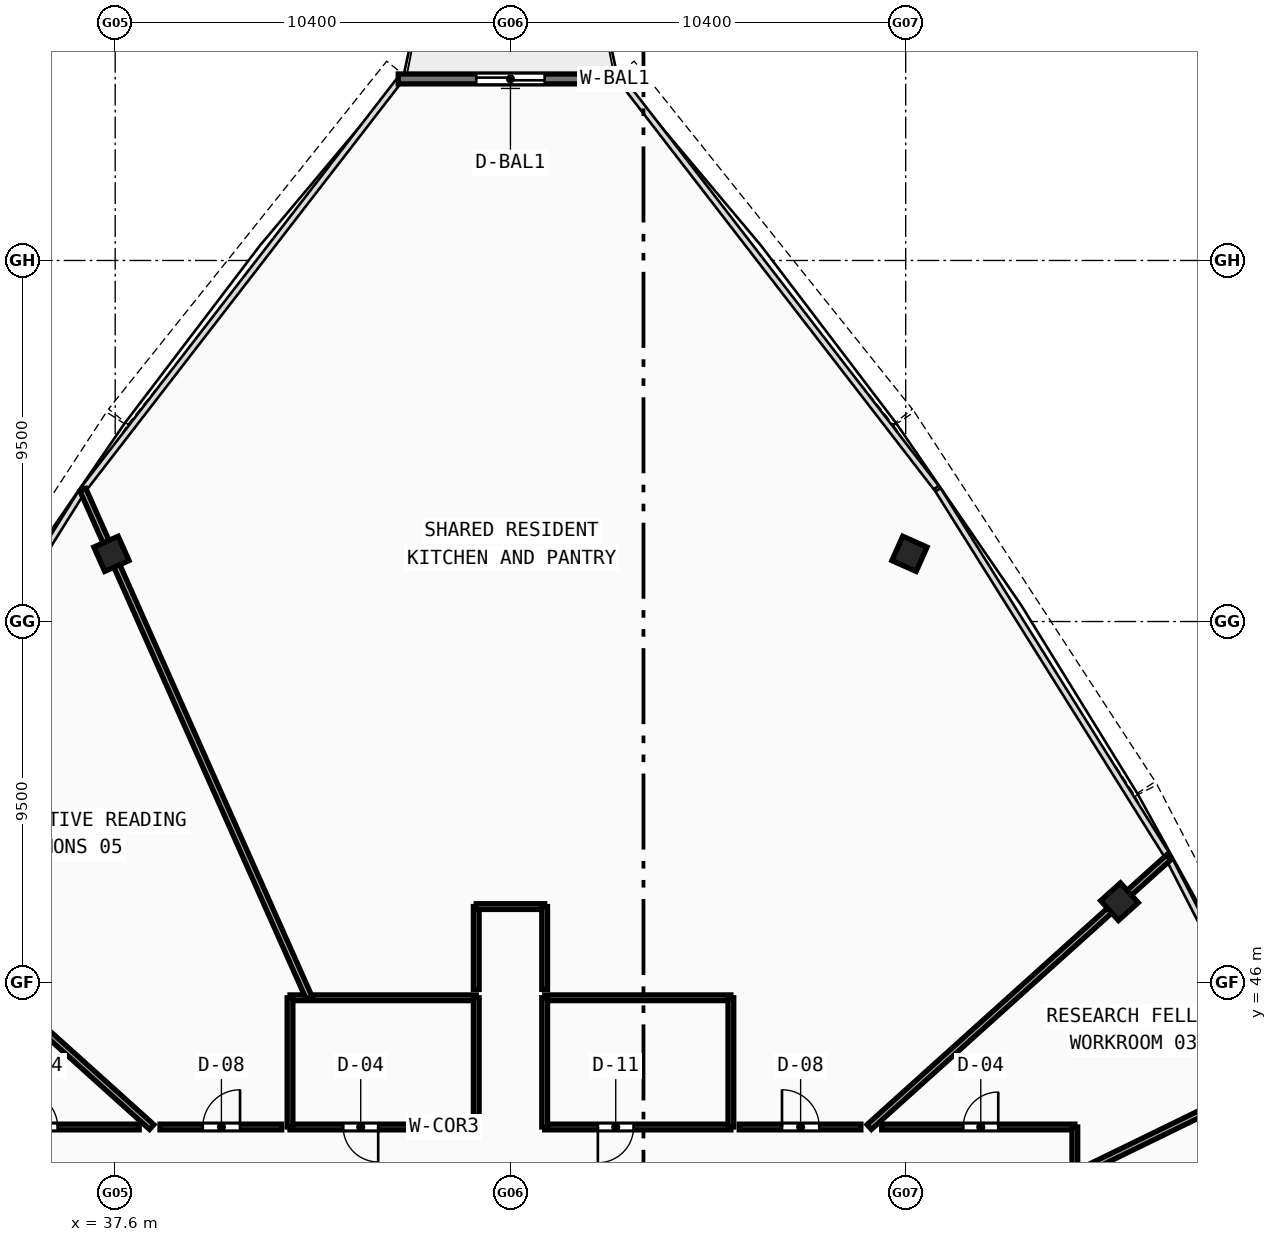
"""IFC4 building model, lengths in metres.
Left out: names, types, materials, properties, quantities, classifications, styles, units other than length and angle.
Written with IfcOpenShell. Run it as: python <this file> out.ifc"""

import sys

from ifc_helpers import new_model, si_unit, direction, frame, frame_2d, origin, origin_with_axes, origin_2d, place, context, subcontext, project, spatial, rectangle, hollow_rectangle, extrude, source, transform, mapped, element, fill, save


model = new_model("IFC4")
c1 = context("Model", 3, precision=1e-05, world=origin(), true_north=direction((0.0, 1.0)))
c2 = subcontext(c1, "Body", "Model", "MODEL_VIEW")
j1 = project(units=[si_unit("LENGTHUNIT", "METRE"), si_unit("PLANEANGLEUNIT", "RADIAN")], contexts=[c1])
p1 = place(None, origin())
s1 = spatial("IfcSite", under=j1, at=p1, CompositionType="ELEMENT")
p2 = place(p1, origin())
s2 = spatial("IfcBuilding", under=s1, at=p2, CompositionType="ELEMENT")
p3 = place(p2, frame((0.0, 0.0, 363.01)))
s3 = spatial("IfcBuildingStorey", under=s2, at=p3, CompositionType="ELEMENT", Elevation=363.01)
m1 = source(origin(), c2, "Body", "SweptSolid", [
    extrude(hollow_rectangle(XDim=0.7, YDim=0.7, WallThickness=0.026, at=origin_2d()), origin(), (0.0, 0.0, 1.0), 3.73),
])
for number, where, z_axis, x_axis in (
    (1, (64.025, 48.129, -0.26), (0.0, 0.0, 1.0), (-0.669, 0.743, 0.0)),
    (2, (58.499, 57.281, -0.26), (0.0, 0.0, 1.0), (-0.914, 0.407, 0.0)),
    (3, (37.501, 57.281, -0.26), (0.0, 0.0, 1.0), (-0.914, -0.407, 0.0)),
):
    element("IfcColumn", number, at=place(p3, frame(where, z_axis=z_axis, x_axis=x_axis)), inside=s3, PredefinedType="COLUMN", context=c2, shape_type="MappedRepresentation", body=[
        mapped(m1, transform((0.0, 0.0, 0.0), scale=1.0)),
    ])
p4 = place(p3, frame((50.952, 69.776, 0.0), z_axis=(0.0, 0.0, 1.0), x_axis=(-1.0, 0.0, 0.0)))
e4 = element("IfcWall", 4, at=p4, inside=s3, PredefinedType="STANDARD", context=c2, shape_type="SweptSolid", body=[
    extrude(rectangle(XDim=5.904, YDim=0.26, at=frame_2d((2.952, 0.0))), origin(), (0.0, 0.0, 1.0), 3.47),
])
p5 = place(p4, frame((2.052, 0.0, 0.0)))
e5 = element("IfcOpeningElement", 5, at=p5, cuts=e4, PredefinedType="OPENING", context=c2, shape_type="SweptSolid", body=[
    extrude(rectangle(XDim=1.8, YDim=2.15, at=frame_2d((0.9, 1.075))), frame((0.0, 0.14, 0.0), z_axis=(0.0, -1.0, 0.0), x_axis=(1.0, 0.0, 0.0)), (0.0, 0.0, 1.0), 0.28),
])
p6 = place(p3, frame((42.2, 42.2, 0.0), z_axis=(0.0, 0.0, 1.0), x_axis=(1.0, 0.0, 0.0)))
e6 = element("IfcWall", 6, at=p6, inside=s3, PredefinedType="PARTITIONING", context=c2, shape_type="SweptSolid", body=[
    extrude(rectangle(XDim=4.9, YDim=0.15, at=frame_2d((2.45, 0.0))), origin(), (0.0, 0.0, 1.0), 2.87),
])
p7 = place(p6, frame((1.4, 0.0, 0.0)))
e7 = element("IfcOpeningElement", 7, at=p7, cuts=e6, PredefinedType="OPENING", context=c2, shape_type="SweptSolid", body=[
    extrude(rectangle(XDim=0.92, YDim=2.1, at=frame_2d((0.46, 1.05))), frame((0.0, 0.085, 0.0), z_axis=(0.0, -1.0, 0.0), x_axis=(1.0, 0.0, 0.0)), (0.0, 0.0, 1.0), 0.17),
])
p8 = place(p3, frame((42.2, 45.6, 0.0), z_axis=(0.0, 0.0, 1.0), x_axis=(1.0, 0.0, 0.0)))
e8 = element("IfcWall", 8, at=p8, inside=s3, PredefinedType="PARTITIONING", context=c2, shape_type="SweptSolid", body=[
    extrude(rectangle(XDim=4.9, YDim=0.15, at=frame_2d((2.45, 0.0))), origin(), (0.0, 0.0, 1.0), 2.87),
])
for number, where, z_axis, x_axis in (
    (9, (42.2, 42.2, 0.0), (0.0, 0.0, 1.0), (0.0, 1.0, 0.0)),
    (10, (47.1, 42.2, 0.0), (0.0, 0.0, 1.0), (0.0, 1.0, 0.0)),
):
    element("IfcWall", number, at=place(p3, frame(where, z_axis=z_axis, x_axis=x_axis)), inside=s3, PredefinedType="PARTITIONING", context=c2, shape_type="SweptSolid", body=[
        extrude(rectangle(XDim=3.4, YDim=0.15, at=frame_2d((1.7, 0.0))), origin(), (0.0, 0.0, 1.0), 3.47),
    ])
p9 = place(p3, frame((48.9, 42.2, 0.0), z_axis=(0.0, 0.0, 1.0), x_axis=(1.0, 0.0, 0.0)))
e11 = element("IfcWall", 11, at=p9, inside=s3, PredefinedType="PARTITIONING", context=c2, shape_type="SweptSolid", body=[
    extrude(rectangle(XDim=4.9, YDim=0.15, at=frame_2d((2.45, 0.0))), origin(), (0.0, 0.0, 1.0), 2.87),
])
p10 = place(p9, frame((1.4, 0.0, 0.0)))
e12 = element("IfcOpeningElement", 12, at=p10, cuts=e11, PredefinedType="OPENING", context=c2, shape_type="SweptSolid", body=[
    extrude(rectangle(XDim=0.94, YDim=2.1, at=frame_2d((0.47, 1.05))), frame((0.0, 0.085, 0.0), z_axis=(0.0, -1.0, 0.0), x_axis=(1.0, 0.0, 0.0)), (0.0, 0.0, 1.0), 0.17),
])
p11 = place(p3, frame((48.9, 45.6, 0.0), z_axis=(0.0, 0.0, 1.0), x_axis=(1.0, 0.0, 0.0)))
e13 = element("IfcWall", 13, at=p11, inside=s3, PredefinedType="PARTITIONING", context=c2, shape_type="SweptSolid", body=[
    extrude(rectangle(XDim=4.9, YDim=0.15, at=frame_2d((2.45, 0.0))), origin(), (0.0, 0.0, 1.0), 2.87),
])
for number, where, z_axis, x_axis in (
    (14, (48.9, 42.2, 0.0), (0.0, 0.0, 1.0), (0.0, 1.0, 0.0)),
    (15, (53.8, 42.2, 0.0), (0.0, 0.0, 1.0), (0.0, 1.0, 0.0)),
):
    element("IfcWall", number, at=place(p3, frame(where, z_axis=z_axis, x_axis=x_axis)), inside=s3, PredefinedType="PARTITIONING", context=c2, shape_type="SweptSolid", body=[
        extrude(rectangle(XDim=3.4, YDim=0.15, at=frame_2d((1.7, 0.0))), origin(), (0.0, 0.0, 1.0), 3.47),
    ])
p12 = place(p3, frame((62.85, 40.943, 0.0), z_axis=(0.0, 0.0, 1.0), x_axis=(0.898803189206, 0.438352400557, 0.0)))
e16 = element("IfcWall", 16, at=p12, inside=s3, PredefinedType="PARTITIONING", context=c2, shape_type="SweptSolid", body=[
    extrude(rectangle(XDim=6.01, YDim=0.17, at=frame_2d((3.005, 0.0))), origin(), (0.0, 0.0, 1.0), 2.87),
])
p13 = place(p3, frame((57.44, 42.2, 0.0), z_axis=(0.0, 0.0, 1.0), x_axis=(0.743152066897, 0.66912256386, 0.0)))
e17 = element("IfcWall", 17, at=p13, inside=s3, PredefinedType="PARTITIONING", context=c2, shape_type="SweptSolid", body=[
    extrude(rectangle(XDim=10.596, YDim=0.17, at=frame_2d((5.298, 0.0))), origin(), (0.0, 0.0, 1.0), 2.87),
])
p14 = place(p3, frame((42.702, 45.6, 0.0), z_axis=(0.0, 0.0, 1.0), x_axis=(-0.406749951551, 0.913539532212, 0.0)))
e18 = element("IfcWall", 18, at=p14, inside=s3, PredefinedType="PARTITIONING", context=c2, shape_type="SweptSolid", body=[
    extrude(rectangle(XDim=14.63, YDim=0.17, at=frame_2d((7.315, 0.0))), origin(), (0.0, 0.0, 1.0), 2.87),
])
p15 = place(p3, frame((38.56, 42.2, 0.0), z_axis=(0.0, 0.0, 1.0), x_axis=(-0.743152066897, 0.66912256386, 0.0)))
e19 = element("IfcWall", 19, at=p15, inside=s3, PredefinedType="PARTITIONING", context=c2, shape_type="SweptSolid", body=[
    extrude(rectangle(XDim=10.596, YDim=0.17, at=frame_2d((5.298, 0.0))), origin(), (0.0, 0.0, 1.0), 2.87),
])
p16 = place(p3, frame((33.15, 42.2, 0.0), z_axis=(0.0, 0.0, 1.0), x_axis=(1.0, 0.0, 0.0)))
e20 = element("IfcWall", 20, at=p16, inside=s3, PredefinedType="PARTITIONING", context=c2, shape_type="SweptSolid", body=[
    extrude(rectangle(XDim=5.081, YDim=0.15, at=frame_2d((2.541, 0.0))), origin(), (0.0, 0.0, 1.0), 3.12),
])
p17 = place(p16, frame((2.015, 0.0, 0.0)))
e21 = element("IfcOpeningElement", 21, at=p17, cuts=e20, PredefinedType="OPENING", context=c2, shape_type="SweptSolid", body=[
    extrude(rectangle(XDim=0.92, YDim=2.1, at=frame_2d((0.46, 1.05))), frame((0.0, 0.085, 0.0), z_axis=(0.0, -1.0, 0.0), x_axis=(1.0, 0.0, 0.0)), (0.0, 0.0, 1.0), 0.17),
])
p18 = place(p3, frame((38.78, 42.2, 0.0), z_axis=(0.0, 0.0, 1.0), x_axis=(1.0, 0.0, 0.0)))
e22 = element("IfcWall", 22, at=p18, inside=s3, PredefinedType="PARTITIONING", context=c2, shape_type="SweptSolid", body=[
    extrude(rectangle(XDim=3.2, YDim=0.15, at=frame_2d((1.6, 0.0))), origin(), (0.0, 0.0, 1.0), 2.87),
])
p19 = place(p18, frame((1.125, 0.0, 0.0)))
e23 = element("IfcOpeningElement", 23, at=p19, cuts=e22, PredefinedType="OPENING", context=c2, shape_type="SweptSolid", body=[
    extrude(rectangle(XDim=0.98, YDim=2.12, at=frame_2d((0.49, 1.06))), frame((0.0, 0.085, 0.0), z_axis=(0.0, -1.0, 0.0), x_axis=(1.0, 0.0, 0.0)), (0.0, 0.0, 1.0), 0.17),
])
p20 = place(p3, frame((47.1, 45.82, 0.0), z_axis=(0.0, 0.0, 1.0), x_axis=(0.0, 1.0, 0.0)))
e24 = element("IfcWall", 24, at=p20, inside=s3, PredefinedType="PARTITIONING", context=c2, shape_type="SweptSolid", body=[
    extrude(rectangle(XDim=2.18, YDim=0.15, at=frame_2d((1.09, 0.0))), origin(), (0.0, 0.0, 1.0), 3.12),
])
p21 = place(p3, frame((47.1, 48.0, 0.0), z_axis=(0.0, 0.0, 1.0), x_axis=(1.0, 0.0, 0.0)))
e25 = element("IfcWall", 25, at=p21, inside=s3, PredefinedType="PARTITIONING", context=c2, shape_type="SweptSolid", body=[
    extrude(rectangle(XDim=1.8, YDim=0.15, at=frame_2d((0.9, 0.0))), origin(), (0.0, 0.0, 1.0), 3.47),
])
p22 = place(p3, frame((48.9, 48.0, 0.0), z_axis=(0.0, 0.0, 1.0), x_axis=(0.0, -1.0, 0.0)))
e26 = element("IfcWall", 26, at=p22, inside=s3, PredefinedType="PARTITIONING", context=c2, shape_type="SweptSolid", body=[
    extrude(rectangle(XDim=2.18, YDim=0.15, at=frame_2d((1.09, 0.0))), origin(), (0.0, 0.0, 1.0), 3.12),
])
p23 = place(p3, frame((54.02, 42.2, 0.0), z_axis=(0.0, 0.0, 1.0), x_axis=(1.0, 0.0, 0.0)))
e27 = element("IfcWall", 27, at=p23, inside=s3, PredefinedType="PARTITIONING", context=c2, shape_type="SweptSolid", body=[
    extrude(rectangle(XDim=3.2, YDim=0.15, at=frame_2d((1.6, 0.0))), origin(), (0.0, 0.0, 1.0), 2.87),
])
p24 = place(p23, frame((1.125, 0.0, 0.0)))
e28 = element("IfcOpeningElement", 28, at=p24, cuts=e27, PredefinedType="OPENING", context=c2, shape_type="SweptSolid", body=[
    extrude(rectangle(XDim=0.98, YDim=2.12, at=frame_2d((0.49, 1.06))), frame((0.0, 0.085, 0.0), z_axis=(0.0, -1.0, 0.0), x_axis=(1.0, 0.0, 0.0)), (0.0, 0.0, 1.0), 0.17),
])
p25 = place(p3, frame((57.769, 42.2, 0.0), z_axis=(0.0, 0.0, 1.0), x_axis=(1.0, 0.0, 0.0)))
e29 = element("IfcWall", 29, at=p25, inside=s3, PredefinedType="PARTITIONING", context=c2, shape_type="SweptSolid", body=[
    extrude(rectangle(XDim=5.081, YDim=0.15, at=frame_2d((2.541, 0.0))), origin(), (0.0, 0.0, 1.0), 3.12),
])
p26 = place(p25, frame((2.146, 0.0, 0.0)))
e30 = element("IfcOpeningElement", 30, at=p26, cuts=e29, PredefinedType="OPENING", context=c2, shape_type="SweptSolid", body=[
    extrude(rectangle(XDim=0.92, YDim=2.1, at=frame_2d((0.46, 1.05))), frame((0.0, 0.085, 0.0), z_axis=(0.0, -1.0, 0.0), x_axis=(1.0, 0.0, 0.0)), (0.0, 0.0, 1.0), 0.17),
])
p27 = place(p3, frame((62.85, 42.2, 0.0), z_axis=(0.0, 0.0, 1.0), x_axis=(0.0, -1.0, 0.0)))
e31 = element("IfcWall", 31, at=p27, inside=s3, PredefinedType="PARTITIONING", context=c2, shape_type="SweptSolid", body=[
    extrude(rectangle(XDim=1.012, YDim=0.15, at=frame_2d((0.506, 0.0))), origin(), (0.0, 0.0, 1.0), 3.47),
])
m2 = source(origin(), c2, "Body", "SweptSolid", [
    extrude(rectangle(XDim=1.8, YDim=2.15, at=frame_2d((0.9, 1.075))), frame((0.0, 0.025, 0.0), z_axis=(0.0, -1.0, 0.0), x_axis=(1.0, 0.0, 0.0)), (0.0, 0.0, 1.0), 0.05),
])
p28 = place(p5, origin_with_axes())
e32 = element("IfcDoor", 32, at=p28, inside=s3, OperationType="DOUBLE_DOOR_SLIDING", PredefinedType="DOOR", context=c2, shape_type="MappedRepresentation", body=[
    mapped(m2, transform((0.0, 0.0, 0.0), scale=1.0)),
])
fill(e5, e32)
m3 = source(origin(), c2, "Body", "SweptSolid", [
    extrude(rectangle(XDim=0.92, YDim=2.1, at=frame_2d((0.46, 1.05))), frame((0.0, 0.025, 0.0), z_axis=(0.0, -1.0, 0.0), x_axis=(1.0, 0.0, 0.0)), (0.0, 0.0, 1.0), 0.05),
])
p29 = place(p7, frame((0.92, 0.0, 0.0), z_axis=(0.0, 0.0, 1.0), x_axis=(-1.0, 0.0, 0.0)))
e33 = element("IfcDoor", 33, at=p29, inside=s3, OperationType="SINGLE_SWING_LEFT", PredefinedType="DOOR", context=c2, shape_type="MappedRepresentation", body=[
    mapped(m3, transform((0.0, 0.0, 0.0), scale=1.0)),
])
fill(e7, e33)
m4 = source(origin(), c2, "Body", "SweptSolid", [
    extrude(rectangle(XDim=0.94, YDim=2.1, at=frame_2d((0.47, 1.05))), frame((0.0, 0.025, 0.0), z_axis=(0.0, -1.0, 0.0), x_axis=(1.0, 0.0, 0.0)), (0.0, 0.0, 1.0), 0.05),
])
p30 = place(p10, frame((0.94, 0.0, 0.0), z_axis=(0.0, 0.0, 1.0), x_axis=(-1.0, 0.0, 0.0)))
e34 = element("IfcDoor", 34, at=p30, inside=s3, OperationType="SINGLE_SWING_RIGHT", PredefinedType="DOOR", context=c2, shape_type="MappedRepresentation", body=[
    mapped(m4, transform((0.0, 0.0, 0.0), scale=1.0)),
])
fill(e12, e34)
p31 = place(p26, origin_with_axes())
e35 = element("IfcDoor", 35, at=p31, inside=s3, OperationType="SINGLE_SWING_RIGHT", PredefinedType="DOOR", context=c2, shape_type="MappedRepresentation", body=[
    mapped(m3, transform((0.0, 0.0, 0.0), scale=1.0)),
])
fill(e30, e35)
m5 = source(origin(), c2, "Body", "SweptSolid", [
    extrude(rectangle(XDim=0.98, YDim=2.12, at=frame_2d((0.49, 1.06))), frame((0.0, 0.025, 0.0), z_axis=(0.0, -1.0, 0.0), x_axis=(1.0, 0.0, 0.0)), (0.0, 0.0, 1.0), 0.05),
])
p32 = place(p24, origin_with_axes())
e36 = element("IfcDoor", 36, at=p32, inside=s3, OperationType="SINGLE_SWING_LEFT", PredefinedType="DOOR", context=c2, shape_type="MappedRepresentation", body=[
    mapped(m5, transform((0.0, 0.0, 0.0), scale=1.0)),
])
fill(e28, e36)
p33 = place(p19, origin_with_axes())
e37 = element("IfcDoor", 37, at=p33, inside=s3, OperationType="SINGLE_SWING_RIGHT", PredefinedType="DOOR", context=c2, shape_type="MappedRepresentation", body=[
    mapped(m5, transform((0.0, 0.0, 0.0), scale=1.0)),
])
fill(e23, e37)
p34 = place(p17, origin_with_axes())
e38 = element("IfcDoor", 38, at=p34, inside=s3, OperationType="SINGLE_SWING_LEFT", PredefinedType="DOOR", context=c2, shape_type="MappedRepresentation", body=[
    mapped(m3, transform((0.0, 0.0, 0.0), scale=1.0)),
])
fill(e21, e38)
save(model, sys.argv[1])
